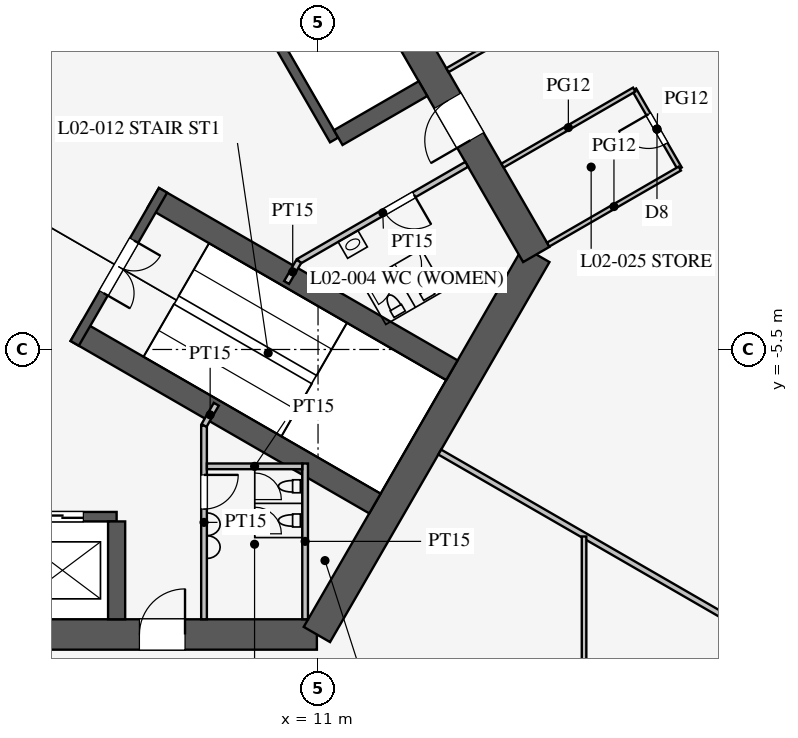
"""IFC4 building model, lengths in metres.
Left out: names, types, materials, properties, quantities, classifications, styles, units other than length and angle.
Written with IfcOpenShell. Run it as: python <this file> out.ifc"""

import sys

from ifc_helpers import new_model, si_unit, direction, frame, frame_2d, origin, place, context, subcontext, project, spatial, rectangle, extrude, element, fill, save


model = new_model("IFC4")
c1 = context("Model", 3, precision=1e-05, world=origin(), true_north=direction((0.0, 1.0)))
c2 = subcontext(c1, "Body", "Model", "MODEL_VIEW")
j1 = project(units=[si_unit("LENGTHUNIT", "METRE"), si_unit("PLANEANGLEUNIT", "RADIAN")], contexts=[c1])
p1 = place(None, origin())
s1 = spatial("IfcSite", under=j1, at=p1, CompositionType="ELEMENT")
p2 = place(p1, origin())
s2 = spatial("IfcBuilding", under=s1, at=p2, CompositionType="ELEMENT")
p3 = place(p2, frame((0.0, 0.0, 11.5)))
s3 = spatial("IfcBuildingStorey", under=s2, at=p3, CompositionType="ELEMENT", Elevation=11.5)
p4 = place(p3, frame((-10.97, -13.0, 0.0), z_axis=(0.0, 0.0, 1.0), x_axis=(1.0, 0.0, 0.0)))
e1 = element("IfcWall", 1, at=p4, inside=s3, PredefinedType="SHEAR", context=c2, shape_type="SweptSolid", body=[
    extrude(rectangle(XDim=21.939, YDim=0.8, at=frame_2d((10.97, 0.0))), origin(), (0.0, 0.0, 1.0), 5.0),
])
p5 = place(p4, frame((17.27, 0.0, 0.0)))
e2 = element("IfcOpeningElement", 2, at=p5, cuts=e1, PredefinedType="OPENING", context=c2, shape_type="SweptSolid", body=[
    extrude(rectangle(XDim=1.2, YDim=2.1, at=frame_2d((0.6, 1.05))), frame((0.0, 0.41, 0.0), z_axis=(0.0, -1.0, 0.0), x_axis=(1.0, 0.0, 0.0)), (0.0, 0.0, 1.0), 0.82),
])
p6 = place(p4, frame((3.47, 0.0, 0.0)))
e3 = element("IfcOpeningElement", 3, at=p6, cuts=e1, PredefinedType="OPENING", context=c2, shape_type="SweptSolid", body=[
    extrude(rectangle(XDim=1.2, YDim=2.1, at=frame_2d((0.6, 1.05))), frame((0.0, 0.41, 0.0), z_axis=(0.0, -1.0, 0.0), x_axis=(1.0, 0.0, 0.0)), (0.0, 0.0, 1.0), 0.82),
])
p7 = place(p3, frame((10.97, -13.0, 0.0), z_axis=(0.0, 0.0, 1.0), x_axis=(0.499995765644, 0.866027848477, 0.0)))
e4 = element("IfcWall", 4, at=p7, inside=s3, PredefinedType="SHEAR", context=c2, shape_type="SweptSolid", body=[
    extrude(rectangle(XDim=11.547, YDim=0.8, at=frame_2d((5.773, 0.0))), origin(), (0.0, 0.0, 1.0), 5.0),
])
p8 = place(p3, frame((16.743, -3.0, 0.0), z_axis=(0.0, 0.0, 1.0), x_axis=(-0.500002442456, 0.866023993627, 0.0)))
e5 = element("IfcWall", 5, at=p8, inside=s3, PredefinedType="SHEAR", context=c2, shape_type="SweptSolid", body=[
    extrude(rectangle(XDim=21.939, YDim=0.8, at=frame_2d((10.97, 0.0))), origin(), (0.0, 0.0, 1.0), 5.0),
])
p9 = place(p8, frame((17.27, 0.0, 0.0)))
e6 = element("IfcOpeningElement", 6, at=p9, cuts=e5, PredefinedType="OPENING", context=c2, shape_type="SweptSolid", body=[
    extrude(rectangle(XDim=1.2, YDim=2.1, at=frame_2d((0.6, 1.05))), frame((0.0, 0.41, 0.0), z_axis=(0.0, -1.0, 0.0), x_axis=(1.0, 0.0, 0.0)), (0.0, 0.0, 1.0), 0.82),
])
p10 = place(p8, frame((3.47, 0.0, 0.0)))
e7 = element("IfcOpeningElement", 7, at=p10, cuts=e5, PredefinedType="OPENING", context=c2, shape_type="SweptSolid", body=[
    extrude(rectangle(XDim=1.2, YDim=2.1, at=frame_2d((0.6, 1.05))), frame((0.0, 0.41, 0.0), z_axis=(0.0, -1.0, 0.0), x_axis=(1.0, 0.0, 0.0)), (0.0, 0.0, 1.0), 0.82),
])
p11 = place(p3, frame((-5.7, -9.9, 0.0), z_axis=(0.0, 0.0, 1.0), x_axis=(1.0, 0.0, 0.0)))
e8 = element("IfcWall", 8, at=p11, inside=s3, PredefinedType="SHEAR", context=c2, shape_type="SweptSolid", body=[
    extrude(rectangle(XDim=11.4, YDim=0.25, at=frame_2d((5.7, 0.0))), origin(), (0.0, 0.0, 1.0), 5.0),
])
p12 = place(p11, frame((0.875, 0.0, 0.0)))
e9 = element("IfcOpeningElement", 9, at=p12, cuts=e8, PredefinedType="OPENING", context=c2, shape_type="SweptSolid", body=[
    extrude(rectangle(XDim=1.1, YDim=2.2, at=frame_2d((0.55, 1.1))), frame((0.0, 0.135, 0.0), z_axis=(0.0, -1.0, 0.0), x_axis=(1.0, 0.0, 0.0)), (0.0, 0.0, 1.0), 0.27),
])
p13 = place(p11, frame((3.725, 0.0, 0.0)))
e10 = element("IfcOpeningElement", 10, at=p13, cuts=e8, PredefinedType="OPENING", context=c2, shape_type="SweptSolid", body=[
    extrude(rectangle(XDim=1.1, YDim=2.2, at=frame_2d((0.55, 1.1))), frame((0.0, 0.135, 0.0), z_axis=(0.0, -1.0, 0.0), x_axis=(1.0, 0.0, 0.0)), (0.0, 0.0, 1.0), 0.27),
])
p14 = place(p11, frame((6.575, 0.0, 0.0)))
e11 = element("IfcOpeningElement", 11, at=p14, cuts=e8, PredefinedType="OPENING", context=c2, shape_type="SweptSolid", body=[
    extrude(rectangle(XDim=1.1, YDim=2.2, at=frame_2d((0.55, 1.1))), frame((0.0, 0.135, 0.0), z_axis=(0.0, -1.0, 0.0), x_axis=(1.0, 0.0, 0.0)), (0.0, 0.0, 1.0), 0.27),
])
p15 = place(p11, frame((9.425, 0.0, 0.0)))
e12 = element("IfcOpeningElement", 12, at=p15, cuts=e8, PredefinedType="OPENING", context=c2, shape_type="SweptSolid", body=[
    extrude(rectangle(XDim=1.1, YDim=2.2, at=frame_2d((0.55, 1.1))), frame((0.0, 0.135, 0.0), z_axis=(0.0, -1.0, 0.0), x_axis=(1.0, 0.0, 0.0)), (0.0, 0.0, 1.0), 0.27),
])
p16 = place(p3, frame((5.7, -10.025, 0.0), z_axis=(0.0, 0.0, 1.0), x_axis=(0.0, -1.0, 0.0)))
e13 = element("IfcWall", 13, at=p16, inside=s3, PredefinedType="SHEAR", context=c2, shape_type="SweptSolid", body=[
    extrude(rectangle(XDim=2.575, YDim=0.45, at=frame_2d((1.288, 0.0))), origin(), (0.0, 0.0, 1.0), 5.0),
])
p17 = place(p3, frame((11.424, 0.014, 0.0), z_axis=(0.0, 0.0, 1.0), x_axis=(-0.500001763848, 0.866024385424, 0.0)))
e14 = element("IfcWall", 14, at=p17, inside=s3, PredefinedType="SHEAR", context=c2, shape_type="SweptSolid", body=[
    extrude(rectangle(XDim=11.4, YDim=0.25, at=frame_2d((5.7, 0.0))), origin(), (0.0, 0.0, 1.0), 5.0),
])
p18 = place(p3, frame((11.532, 0.076, 0.0), z_axis=(0.0, 0.0, 1.0), x_axis=(0.866005588531, 0.500034319456, 0.0)))
e15 = element("IfcWall", 15, at=p18, inside=s3, PredefinedType="SHEAR", context=c2, shape_type="SweptSolid", body=[
    extrude(rectangle(XDim=2.575, YDim=0.45, at=frame_2d((1.288, 0.0))), origin(), (0.0, 0.0, 1.0), 5.0),
])
for number, where, z_axis, x_axis in (
    (16, (4.638, -5.016, 0.0), (0.0, 0.0, 1.0), (0.866, -0.5, 0.0)),
    (17, (6.663, -1.509, 0.0), (0.0, 0.0, 1.0), (0.866, -0.5, 0.0)),
):
    element("IfcWall", number, at=place(p3, frame(where, z_axis=z_axis, x_axis=x_axis)), inside=s3, PredefinedType="SHEAR", context=c2, shape_type="SweptSolid", body=[
        extrude(rectangle(XDim=9.075, YDim=0.6, at=frame_2d((4.538, 0.0))), origin(), (0.0, 0.0, 1.0), 5.0),
    ])
p19 = place(p3, frame((4.597, -5.339, 0.0), z_axis=(0.0, 0.0, 1.0), x_axis=(0.499984536904, 0.866034331223, 0.0)))
e18 = element("IfcWall", 18, at=p19, inside=s3, PredefinedType="SHEAR", context=c2, shape_type="SweptSolid", body=[
    extrude(rectangle(XDim=4.65, YDim=0.25, at=frame_2d((2.325, 0.0))), origin(), (0.0, 0.0, 1.0), 5.0),
])
p20 = place(p19, frame((1.525, 0.0, 0.0)))
e19 = element("IfcOpeningElement", 19, at=p20, cuts=e18, PredefinedType="OPENING", context=c2, shape_type="SweptSolid", body=[
    extrude(rectangle(XDim=1.6, YDim=2.1, at=frame_2d((0.8, 1.05))), frame((0.0, 0.135, 0.0), z_axis=(0.0, -1.0, 0.0), x_axis=(1.0, 0.0, 0.0)), (0.0, 0.0, 1.0), 0.27),
])
p21 = place(p3, frame((8.0, -7.5, 0.0), z_axis=(0.0, 0.0, 1.0), x_axis=(0.0, -1.0, 0.0)))
e20 = element("IfcWall", 20, at=p21, inside=s3, PredefinedType="PARTITIONING", context=c2, shape_type="SweptSolid", body=[
    extrude(rectangle(XDim=5.1, YDim=0.15, at=frame_2d((2.55, 0.0))), origin(), (0.0, 0.0, 1.0), 4.8),
])
p22 = place(p21, frame((1.3, 0.0, 0.0)))
e21 = element("IfcOpeningElement", 21, at=p22, cuts=e20, PredefinedType="OPENING", context=c2, shape_type="SweptSolid", body=[
    extrude(rectangle(XDim=0.9, YDim=2.1, at=frame_2d((0.45, 1.05))), frame((0.0, 0.085, 0.0), z_axis=(0.0, -1.0, 0.0), x_axis=(1.0, 0.0, 0.0)), (0.0, 0.0, 1.0), 0.17),
])
p23 = place(p3, frame((10.495, -3.178, 0.0), z_axis=(0.0, 0.0, 1.0), x_axis=(0.86602216432, 0.500005610874, 0.0)))
e22 = element("IfcWall", 22, at=p23, inside=s3, PredefinedType="PARTITIONING", context=c2, shape_type="SweptSolid", body=[
    extrude(rectangle(XDim=5.1, YDim=0.15, at=frame_2d((2.55, 0.0))), origin(), (0.0, 0.0, 1.0), 4.8),
])
p24 = place(p23, frame((2.6, 0.0, 0.0)))
e23 = element("IfcOpeningElement", 23, at=p24, cuts=e22, PredefinedType="OPENING", context=c2, shape_type="SweptSolid", body=[
    extrude(rectangle(XDim=0.9, YDim=2.1, at=frame_2d((0.45, 1.05))), frame((0.0, 0.085, 0.0), z_axis=(0.0, -1.0, 0.0), x_axis=(1.0, 0.0, 0.0)), (0.0, 0.0, 1.0), 0.17),
])
for number, where, z_axis, x_axis in (
    (24, (8.0, -7.5, 0.0), (0.0, 0.0, 1.0), (0.5, 0.866, 0.0)),
    (25, (10.495, -3.178, 0.0), (0.0, 0.0, 1.0), (-0.5, -0.866, 0.0)),
):
    element("IfcWall", number, at=place(p3, frame(where, z_axis=z_axis, x_axis=x_axis)), inside=s3, PredefinedType="PARTITIONING", context=c2, shape_type="SweptSolid", body=[
        extrude(rectangle(XDim=0.645, YDim=0.15, at=frame_2d((0.323, 0.0))), origin(), (0.0, 0.0, 1.0), 4.8),
    ])
p25 = place(p3, frame((10.66, -8.5, 0.0), z_axis=(0.0, 0.0, 1.0), x_axis=(0.0, -1.0, 0.0)))
e26 = element("IfcWall", 26, at=p25, inside=s3, PredefinedType="PARTITIONING", context=c2, shape_type="SweptSolid", body=[
    extrude(rectangle(XDim=4.1, YDim=0.15, at=frame_2d((2.05, 0.0))), origin(), (0.0, 0.0, 1.0), 4.8),
])
p26 = place(p3, frame((8.075, -8.575, 0.0), z_axis=(0.0, 0.0, 1.0), x_axis=(1.0, 0.0, 0.0)))
e27 = element("IfcWall", 27, at=p26, inside=s3, PredefinedType="PARTITIONING", context=c2, shape_type="SweptSolid", body=[
    extrude(rectangle(XDim=2.51, YDim=0.15, at=frame_2d((1.255, 0.0))), origin(), (0.0, 0.0, 1.0), 4.8),
])
p27 = place(p3, frame((14.203, -8.2, 0.0), z_axis=(0.0, 0.0, 1.0), x_axis=(0.866024965723, -0.500000758745, 0.0)))
e28 = element("IfcWall", 28, at=p27, inside=s3, PredefinedType="PARTITIONING", context=c2, shape_type="SweptSolid", body=[
    extrude(rectangle(XDim=18.25, YDim=0.15, at=frame_2d((9.125, 0.0))), origin(), (0.0, 0.0, 1.0), 3.1),
])
p28 = place(p3, frame((18.0, -10.421, 0.0), z_axis=(0.0, 0.0, 1.0), x_axis=(0.0, -1.0, 0.0)))
e29 = element("IfcWall", 29, at=p28, inside=s3, PredefinedType="PARTITIONING", context=c2, shape_type="SweptSolid", body=[
    extrude(rectangle(XDim=14.688, YDim=0.12, at=frame_2d((7.344, 0.0))), origin(), (0.0, 0.0, 1.0), 3.6),
])
p29 = place(p28, frame((3.45, 0.0, 0.0)))
e30 = element("IfcOpeningElement", 30, at=p29, cuts=e29, PredefinedType="OPENING", context=c2, shape_type="SweptSolid", body=[
    extrude(rectangle(XDim=0.9, YDim=2.1, at=frame_2d((0.45, 1.05))), frame((0.0, 0.07, 0.0), z_axis=(0.0, -1.0, 0.0), x_axis=(1.0, 0.0, 0.0)), (0.0, 0.0, 1.0), 0.14),
])
p30 = place(p3, frame((20.519, -0.74, 0.0), z_axis=(0.0, 0.0, 1.0), x_axis=(-0.499957262057, 0.866050077142, 0.0)))
e31 = element("IfcWall", 31, at=p30, inside=s3, PredefinedType="PARTITIONING", context=c2, shape_type="SweptSolid", body=[
    extrude(rectangle(XDim=2.4, YDim=0.12, at=frame_2d((1.2, 0.0))), origin(), (0.0, 0.0, 1.0), 3.6),
])
p31 = place(p30, frame((0.75, 0.0, 0.0)))
e32 = element("IfcOpeningElement", 32, at=p31, cuts=e31, PredefinedType="OPENING", context=c2, shape_type="SweptSolid", body=[
    extrude(rectangle(XDim=0.9, YDim=2.1, at=frame_2d((0.45, 1.05))), frame((0.0, 0.07, 0.0), z_axis=(0.0, -1.0, 0.0), x_axis=(1.0, 0.0, 0.0)), (0.0, 0.0, 1.0), 0.14),
])
for number, where, z_axis, x_axis in (
    (33, (17.055, -2.74, 0.0), (0.0, 0.0, 1.0), (0.866, 0.5, 0.0)),
    (34, (14.405, 1.85, 0.0), (0.0, 0.0, 1.0), (0.866, 0.5, 0.0)),
    (35, (15.855, -0.661, 0.0), (0.0, 0.0, 1.0), (0.866, 0.5, 0.0)),
):
    element("IfcWall", number, at=place(p3, frame(where, z_axis=z_axis, x_axis=x_axis)), inside=s3, PredefinedType="PARTITIONING", context=c2, shape_type="SweptSolid", body=[
        extrude(rectangle(XDim=4.0, YDim=0.12, at=frame_2d((2.0, 0.0))), origin(), (0.0, 0.0, 1.0), 3.6),
    ])
p32 = place(p22, origin())
e36 = element("IfcDoor", 36, at=p32, inside=s3, OperationType="SINGLE_SWING_LEFT", PredefinedType="DOOR", context=c2, shape_type="SweptSolid", body=[
    extrude(rectangle(XDim=0.9, YDim=2.1, at=frame_2d((0.45, 1.05))), frame((0.0, 0.025, 0.0), z_axis=(0.0, -1.0, 0.0), x_axis=(1.0, 0.0, 0.0)), (0.0, 0.0, 1.0), 0.05),
])
fill(e21, e36)
p33 = place(p24, frame((0.9, 0.0, 0.0), z_axis=(0.0, 0.0, 1.0), x_axis=(-1.0, 0.0, 0.0)))
e37 = element("IfcDoor", 37, at=p33, inside=s3, OperationType="SINGLE_SWING_LEFT", PredefinedType="DOOR", context=c2, shape_type="SweptSolid", body=[
    extrude(rectangle(XDim=0.9, YDim=2.1, at=frame_2d((0.45, 1.05))), frame((0.0, 0.025, 0.0), z_axis=(0.0, -1.0, 0.0), x_axis=(1.0, 0.0, 0.0)), (0.0, 0.0, 1.0), 0.05),
])
fill(e23, e37)
p34 = place(p20, frame((1.6, 0.0, 0.0), z_axis=(0.0, 0.0, 1.0), x_axis=(-1.0, 0.0, 0.0)))
e38 = element("IfcDoor", 38, at=p34, inside=s3, OperationType="DOUBLE_DOOR_SINGLE_SWING", PredefinedType="DOOR", context=c2, shape_type="SweptSolid", body=[
    extrude(rectangle(XDim=1.6, YDim=2.1, at=frame_2d((0.8, 1.05))), frame((0.0, 0.025, 0.0), z_axis=(0.0, -1.0, 0.0), x_axis=(1.0, 0.0, 0.0)), (0.0, 0.0, 1.0), 0.05),
])
fill(e19, e38)
p35 = place(p5, origin())
e39 = element("IfcDoor", 39, at=p35, inside=s3, OperationType="SINGLE_SWING_RIGHT", PredefinedType="DOOR", context=c2, shape_type="SweptSolid", body=[
    extrude(rectangle(XDim=1.2, YDim=2.1, at=frame_2d((0.6, 1.05))), frame((0.0, 0.025, 0.0), z_axis=(0.0, -1.0, 0.0), x_axis=(1.0, 0.0, 0.0)), (0.0, 0.0, 1.0), 0.05),
])
fill(e2, e39)
p36 = place(p10, origin())
e40 = element("IfcDoor", 40, at=p36, inside=s3, OperationType="SINGLE_SWING_LEFT", PredefinedType="DOOR", context=c2, shape_type="SweptSolid", body=[
    extrude(rectangle(XDim=1.2, YDim=2.1, at=frame_2d((0.6, 1.05))), frame((0.0, 0.025, 0.0), z_axis=(0.0, -1.0, 0.0), x_axis=(1.0, 0.0, 0.0)), (0.0, 0.0, 1.0), 0.05),
])
fill(e7, e40)
p37 = place(p31, origin())
e41 = element("IfcDoor", 41, at=p37, inside=s3, OperationType="SINGLE_SWING_RIGHT", PredefinedType="DOOR", context=c2, shape_type="SweptSolid", body=[
    extrude(rectangle(XDim=0.9, YDim=2.1, at=frame_2d((0.45, 1.05))), frame((0.0, 0.025, 0.0), z_axis=(0.0, -1.0, 0.0), x_axis=(1.0, 0.0, 0.0)), (0.0, 0.0, 1.0), 0.05),
])
fill(e32, e41)
p38 = place(p15, origin())
e42 = element("IfcDoor", 42, at=p38, inside=s3, OperationType="DOUBLE_DOOR_SLIDING", PredefinedType="DOOR", context=c2, shape_type="SweptSolid", body=[
    extrude(rectangle(XDim=1.1, YDim=2.2, at=frame_2d((0.55, 1.1))), frame((0.0, 0.025, 0.0), z_axis=(0.0, -1.0, 0.0), x_axis=(1.0, 0.0, 0.0)), (0.0, 0.0, 1.0), 0.05),
])
fill(e12, e42)
save(model, sys.argv[1])
